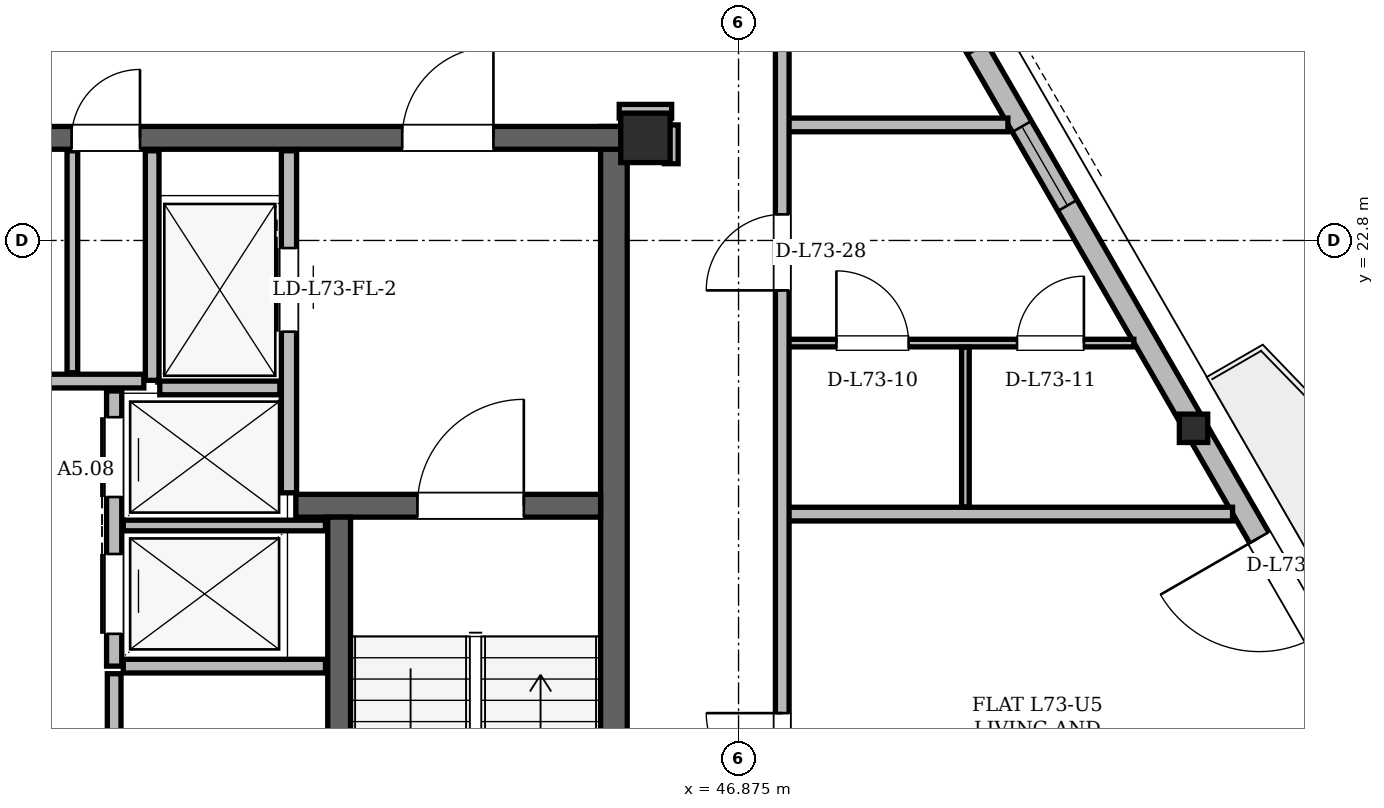
"""IFC4 building model, lengths in metres.
Left out: names, types, materials, properties, quantities, classifications, styles, units other than length and angle.
Written with IfcOpenShell. Run it as: python <this file> out.ifc"""

import sys

from ifc_helpers import new_model, si_unit, direction, frame, frame_2d, origin, origin_2d, place, context, subcontext, project, spatial, rectangle, hollow_rectangle, i_section, extrude, element, fill, save


model = new_model("IFC4")
c1 = context("Model", 3, precision=1e-05, world=origin(), true_north=direction((0.0, 1.0)))
c2 = subcontext(c1, "Body", "Model", "MODEL_VIEW")
j1 = project(units=[si_unit("LENGTHUNIT", "METRE"), si_unit("PLANEANGLEUNIT", "RADIAN")], contexts=[c1])
p1 = place(None, origin())
s1 = spatial("IfcSite", under=j1, at=p1, CompositionType="ELEMENT")
p2 = place(p1, origin())
s2 = spatial("IfcBuilding", under=s1, at=p2, CompositionType="ELEMENT")
p3 = place(p2, frame((0.0, 0.0, 277.2)))
s3 = spatial("IfcBuildingStorey", under=s2, at=p3, CompositionType="ELEMENT", Elevation=277.2)
p4 = place(p3, frame((45.65, 24.15, 0.0), z_axis=(0.0, 0.0, 1.0), x_axis=(1.0, 0.0, 0.0)))
e1 = element("IfcColumn", 1, at=p4, inside=s3, PredefinedType="COLUMN", context=c2, shape_type="SweptSolid", body=[
    extrude(hollow_rectangle(XDim=0.65, YDim=0.65, WallThickness=0.05, at=origin_2d()), origin(), (0.0, 0.0, 1.0), 3.9),
])
p5 = place(p3, frame((52.884, 20.347, 0.005), z_axis=(-0.011857822494, -0.009536449836, 0.999884217382), x_axis=(0.62670422134, -0.779257222587, 0.0)))
e2 = element("IfcColumn", 2, at=p5, inside=s3, PredefinedType="COLUMN", context=c2, shape_type="SweptSolid", body=[
    extrude(i_section(OverallWidth=0.373, OverallDepth=0.373, WebThickness=0.016, FlangeThickness=0.026, at=origin_2d()), origin(), (0.0, 0.0, 1.0), 3.891),
])
p6 = place(p3, frame((45.235, 11.0, 0.0), z_axis=(0.0, 0.0, 1.0), x_axis=(0.0, 1.0, 0.0)))
e3 = element("IfcWall", 3, at=p6, inside=s3, PredefinedType="SHEAR", context=c2, shape_type="SweptSolid", body=[
    extrude(rectangle(XDim=13.3, YDim=0.35, at=frame_2d((6.65, 0.0))), origin(), (0.0, 0.0, 1.0), 3.68),
])
p7 = place(p3, frame((29.65, 24.15, 0.0), z_axis=(0.0, 0.0, 1.0), x_axis=(1.0, 0.0, 0.0)))
e4 = element("IfcWall", 4, at=p7, inside=s3, PredefinedType="SHEAR", context=c2, shape_type="SweptSolid", body=[
    extrude(rectangle(XDim=15.7, YDim=0.3, at=frame_2d((7.85, 0.0))), origin(), (0.0, 0.0, 1.0), 3.68),
])
p8 = place(p7, frame((1.7, 0.0, 0.0)))
e5 = element("IfcOpeningElement", 5, at=p8, cuts=e4, PredefinedType="OPENING", context=c2, shape_type="SweptSolid", body=[
    extrude(rectangle(XDim=1.2, YDim=2.2, at=frame_2d((0.6, 1.1))), frame((0.0, 0.15, 0.0), z_axis=(0.0, -1.0, 0.0), x_axis=(1.0, 0.0, 0.0)), (0.0, 0.0, 1.0), 0.3),
])
p9 = place(p7, frame((12.8, 0.0, 0.0)))
e6 = element("IfcOpeningElement", 6, at=p9, cuts=e4, PredefinedType="OPENING", context=c2, shape_type="SweptSolid", body=[
    extrude(rectangle(XDim=1.2, YDim=2.2, at=frame_2d((0.6, 1.1))), frame((0.0, 0.15, 0.0), z_axis=(0.0, -1.0, 0.0), x_axis=(1.0, 0.0, 0.0)), (0.0, 0.0, 1.0), 0.3),
])
p10 = place(p7, frame((6.55, 0.0, 0.0)))
e7 = element("IfcOpeningElement", 7, at=p10, cuts=e4, PredefinedType="OPENING", context=c2, shape_type="SweptSolid", body=[
    extrude(rectangle(XDim=0.9, YDim=2.05, at=frame_2d((0.45, 1.025))), frame((0.0, 0.15, 0.0), z_axis=(0.0, -1.0, 0.0), x_axis=(1.0, 0.0, 0.0)), (0.0, 0.0, 1.0), 0.3),
])
p11 = place(p7, frame((8.45, 0.0, 0.0)))
e8 = element("IfcOpeningElement", 8, at=p11, cuts=e4, PredefinedType="OPENING", context=c2, shape_type="SweptSolid", body=[
    extrude(rectangle(XDim=0.9, YDim=2.05, at=frame_2d((0.45, 1.025))), frame((0.0, 0.15, 0.0), z_axis=(0.0, -1.0, 0.0), x_axis=(1.0, 0.0, 0.0)), (0.0, 0.0, 1.0), 0.3),
])
p12 = place(p3, frame((41.05, 19.31, 0.0), z_axis=(0.0, 0.0, 1.0), x_axis=(1.0, 0.0, 0.0)))
e9 = element("IfcWall", 9, at=p12, inside=s3, PredefinedType="SHEAR", context=c2, shape_type="SweptSolid", body=[
    extrude(rectangle(XDim=4.01, YDim=0.3, at=frame_2d((2.005, 0.0))), origin(), (0.0, 0.0, 1.0), 3.68),
])
p13 = place(p12, frame((1.6, 0.0, 0.0)))
e10 = element("IfcOpeningElement", 10, at=p13, cuts=e9, PredefinedType="OPENING", context=c2, shape_type="SweptSolid", body=[
    extrude(rectangle(XDim=1.4, YDim=2.2, at=frame_2d((0.7, 1.1))), frame((0.0, 0.15, 0.0), z_axis=(0.0, -1.0, 0.0), x_axis=(1.0, 0.0, 0.0)), (0.0, 0.0, 1.0), 0.3),
])
p14 = place(p3, frame((41.62, 11.54, 0.0), z_axis=(0.0, 0.0, 1.0), x_axis=(0.0, 1.0, 0.0)))
e11 = element("IfcWall", 11, at=p14, inside=s3, PredefinedType="SHEAR", context=c2, shape_type="SweptSolid", body=[
    extrude(rectangle(XDim=7.62, YDim=0.3, at=frame_2d((3.81, 0.0))), origin(), (0.0, 0.0, 1.0), 3.68),
])
p15 = place(p3, frame((58.493, 10.633, 0.0), z_axis=(0.0, 0.0, 1.0), x_axis=(-0.499998095684, 0.866026503239, 0.0)))
e12 = element("IfcWall", 12, at=p15, inside=s3, PredefinedType="SOLIDWALL", context=c2, shape_type="SweptSolid", body=[
    extrude(rectangle(XDim=37.389, YDim=0.29, at=frame_2d((18.695, 0.0))), origin(), (0.0, 0.0, 1.0), 3.058),
])
p16 = place(p15, frame((8.034, 0.0, 0.0)))
e13 = element("IfcOpeningElement", 13, at=p16, cuts=e12, PredefinedType="OPENING", context=c2, shape_type="SweptSolid", body=[
    extrude(rectangle(XDim=1.5, YDim=2.2, at=frame_2d((0.75, 1.1))), frame((0.0, 0.145, 0.0), z_axis=(0.0, -1.0, 0.0), x_axis=(1.0, 0.0, 0.0)), (0.0, 0.0, 1.0), 0.29),
])
p17 = place(p15, frame((29.1, 0.0, 0.0)))
e14 = element("IfcOpeningElement", 14, at=p17, cuts=e12, PredefinedType="OPENING", context=c2, shape_type="SweptSolid", body=[
    extrude(rectangle(XDim=1.5, YDim=2.2, at=frame_2d((0.75, 1.1))), frame((0.0, 0.145, 0.0), z_axis=(0.0, -1.0, 0.0), x_axis=(1.0, 0.0, 0.0)), (0.0, 0.0, 1.0), 0.29),
])
p18 = place(p15, frame((3.531, 0.0, 0.85)))
e15 = element("IfcOpeningElement", 15, at=p18, cuts=e12, PredefinedType="OPENING", context=c2, shape_type="SweptSolid", body=[
    extrude(rectangle(XDim=1.2, YDim=1.48, at=frame_2d((0.6, 0.74))), frame((0.0, 0.145, 0.0), z_axis=(0.0, -1.0, 0.0), x_axis=(1.0, 0.0, 0.0)), (0.0, 0.0, 1.0), 0.29),
])
p19 = place(p15, frame((1.055, 0.0, 0.85)))
e16 = element("IfcOpeningElement", 16, at=p19, cuts=e12, PredefinedType="OPENING", context=c2, shape_type="SweptSolid", body=[
    extrude(rectangle(XDim=1.2, YDim=1.48, at=frame_2d((0.6, 0.74))), frame((0.0, 0.145, 0.0), z_axis=(0.0, -1.0, 0.0), x_axis=(1.0, 0.0, 0.0)), (0.0, 0.0, 1.0), 0.29),
])
p20 = place(p15, frame((35.336, 0.0, 0.85)))
e17 = element("IfcOpeningElement", 17, at=p20, cuts=e12, PredefinedType="OPENING", context=c2, shape_type="SweptSolid", body=[
    extrude(rectangle(XDim=1.2, YDim=1.48, at=frame_2d((0.6, 0.74))), frame((0.0, 0.145, 0.0), z_axis=(0.0, -1.0, 0.0), x_axis=(1.0, 0.0, 0.0)), (0.0, 0.0, 1.0), 0.29),
])
p21 = place(p15, frame((16.956, 0.0, 0.85)))
e18 = element("IfcOpeningElement", 18, at=p21, cuts=e12, PredefinedType="OPENING", context=c2, shape_type="SweptSolid", body=[
    extrude(rectangle(XDim=1.2, YDim=1.48, at=frame_2d((0.6, 0.74))), frame((0.0, 0.145, 0.0), z_axis=(0.0, -1.0, 0.0), x_axis=(1.0, 0.0, 0.0)), (0.0, 0.0, 1.0), 0.29),
])
p22 = place(p15, frame((19.392, 0.0, 0.85)))
e19 = element("IfcOpeningElement", 19, at=p22, cuts=e12, PredefinedType="OPENING", context=c2, shape_type="SweptSolid", body=[
    extrude(rectangle(XDim=1.8, YDim=1.75, at=frame_2d((0.9, 0.875))), frame((0.0, 0.145, 0.0), z_axis=(0.0, -1.0, 0.0), x_axis=(1.0, 0.0, 0.0)), (0.0, 0.0, 1.0), 0.29),
])
p23 = place(p15, frame((22.638, 0.0, 0.85)))
e20 = element("IfcOpeningElement", 20, at=p23, cuts=e12, PredefinedType="OPENING", context=c2, shape_type="SweptSolid", body=[
    extrude(rectangle(XDim=2.2, YDim=1.85, at=frame_2d((1.1, 0.925))), frame((0.0, 0.145, 0.0), z_axis=(0.0, -1.0, 0.0), x_axis=(1.0, 0.0, 0.0)), (0.0, 0.0, 1.0), 0.29),
])
p24 = place(p15, frame((14.58, 0.0, 0.85)))
e21 = element("IfcOpeningElement", 21, at=p24, cuts=e12, PredefinedType="OPENING", context=c2, shape_type="SweptSolid", body=[
    extrude(rectangle(XDim=1.2, YDim=1.48, at=frame_2d((0.6, 0.74))), frame((0.0, 0.145, 0.0), z_axis=(0.0, -1.0, 0.0), x_axis=(1.0, 0.0, 0.0)), (0.0, 0.0, 1.0), 0.29),
])
p25 = place(p3, frame((40.96, 19.48, 0.0), z_axis=(0.0, 0.0, 1.0), x_axis=(0.0, 1.0, 0.0)))
e22 = element("IfcWall", 22, at=p25, inside=s3, PredefinedType="PARTITIONING", context=c2, shape_type="SweptSolid", body=[
    extrude(rectangle(XDim=4.5, YDim=0.2, at=frame_2d((2.25, 0.0))), origin(), (0.0, 0.0, 1.0), 3.68),
])
p26 = place(p25, frame((2.12, 0.0, 0.0)))
e23 = element("IfcOpeningElement", 23, at=p26, cuts=e22, PredefinedType="OPENING", context=c2, shape_type="SweptSolid", body=[
    extrude(rectangle(XDim=1.1, YDim=2.2, at=frame_2d((0.55, 1.1))), frame((0.0, 0.1, 0.0), z_axis=(0.0, -1.0, 0.0), x_axis=(1.0, 0.0, 0.0)), (0.0, 0.0, 1.0), 0.2),
])
p27 = place(p3, frame((39.16, 20.96, 0.0), z_axis=(0.0, 0.0, 1.0), x_axis=(0.0, 1.0, 0.0)))
e24 = element("IfcWall", 24, at=p27, inside=s3, PredefinedType="PARTITIONING", context=c2, shape_type="SweptSolid", body=[
    extrude(rectangle(XDim=3.02, YDim=0.18, at=frame_2d((1.51, 0.0))), origin(), (0.0, 0.0, 1.0), 3.68),
])
p28 = place(p3, frame((39.26, 20.86, 0.0), z_axis=(0.0, 0.0, 1.0), x_axis=(1.0, 0.0, 0.0)))
e25 = element("IfcWall", 25, at=p28, inside=s3, PredefinedType="PARTITIONING", context=c2, shape_type="SweptSolid", body=[
    extrude(rectangle(XDim=1.58, YDim=0.18, at=frame_2d((0.79, 0.0))), origin(), (0.0, 0.0, 1.0), 3.68),
])
p29 = place(p3, frame((38.66, 17.2, 0.0), z_axis=(0.0, 0.0, 1.0), x_axis=(0.0, 1.0, 0.0)))
e26 = element("IfcWall", 26, at=p29, inside=s3, PredefinedType="PARTITIONING", context=c2, shape_type="SweptSolid", body=[
    extrude(rectangle(XDim=3.62, YDim=0.2, at=frame_2d((1.81, 0.0))), origin(), (0.0, 0.0, 1.0), 3.68),
])
p30 = place(p29, frame((0.425, 0.0, 0.0)))
e27 = element("IfcOpeningElement", 27, at=p30, cuts=e26, PredefinedType="OPENING", context=c2, shape_type="SweptSolid", body=[
    extrude(rectangle(XDim=1.05, YDim=2.15, at=frame_2d((0.525, 1.075))), frame((0.0, 0.1, 0.0), z_axis=(0.0, -1.0, 0.0), x_axis=(1.0, 0.0, 0.0)), (0.0, 0.0, 1.0), 0.2),
])
p31 = place(p29, frame((2.225, 0.0, 0.0)))
e28 = element("IfcOpeningElement", 28, at=p31, cuts=e26, PredefinedType="OPENING", context=c2, shape_type="SweptSolid", body=[
    extrude(rectangle(XDim=1.05, YDim=2.15, at=frame_2d((0.525, 1.075))), frame((0.0, 0.1, 0.0), z_axis=(0.0, -1.0, 0.0), x_axis=(1.0, 0.0, 0.0)), (0.0, 0.0, 1.0), 0.2),
])
p32 = place(p3, frame((38.78, 17.2, 0.0), z_axis=(0.0, 0.0, 1.0), x_axis=(1.0, 0.0, 0.0)))
e29 = element("IfcWall", 29, at=p32, inside=s3, PredefinedType="PARTITIONING", context=c2, shape_type="SweptSolid", body=[
    extrude(rectangle(XDim=2.66, YDim=0.18, at=frame_2d((1.33, 0.0))), origin(), (0.0, 0.0, 1.0), 3.68),
])
p33 = place(p3, frame((38.78, 19.05, 0.0), z_axis=(0.0, 0.0, 1.0), x_axis=(1.0, 0.0, 0.0)))
e30 = element("IfcWall", 30, at=p33, inside=s3, PredefinedType="PARTITIONING", context=c2, shape_type="SweptSolid", body=[
    extrude(rectangle(XDim=2.66, YDim=0.14, at=frame_2d((1.33, 0.0))), origin(), (0.0, 0.0, 1.0), 3.68),
])
p34 = place(p3, frame((38.66, 11.55, 0.0), z_axis=(0.0, 0.0, 1.0), x_axis=(0.0, 1.0, 0.0)))
e31 = element("IfcWall", 31, at=p34, inside=s3, PredefinedType="PARTITIONING", context=c2, shape_type="SweptSolid", body=[
    extrude(rectangle(XDim=5.55, YDim=0.18, at=frame_2d((2.775, 0.0))), origin(), (0.0, 0.0, 1.0), 3.68),
])
p35 = place(p34, frame((3.15, 0.0, 0.0)))
e32 = element("IfcOpeningElement", 32, at=p35, cuts=e31, PredefinedType="OPENING", context=c2, shape_type="SweptSolid", body=[
    extrude(rectangle(XDim=0.95, YDim=2.1, at=frame_2d((0.475, 1.05))), frame((0.0, 0.09, 0.0), z_axis=(0.0, -1.0, 0.0), x_axis=(1.0, 0.0, 0.0)), (0.0, 0.0, 1.0), 0.18),
])
p36 = place(p3, frame((35.95, 20.95, 0.0), z_axis=(0.0, 0.0, 1.0), x_axis=(1.0, 0.0, 0.0)))
e33 = element("IfcWall", 33, at=p36, inside=s3, PredefinedType="PARTITIONING", context=c2, shape_type="SweptSolid", body=[
    extrude(rectangle(XDim=3.1, YDim=0.18, at=frame_2d((1.55, 0.0))), origin(), (0.0, 0.0, 1.0), 3.68),
])
p37 = place(p3, frame((38.11, 21.06, 0.0), z_axis=(0.0, 0.0, 1.0), x_axis=(0.0, 1.0, 0.0)))
e34 = element("IfcWall", 34, at=p37, inside=s3, PredefinedType="PARTITIONING", context=c2, shape_type="SweptSolid", body=[
    extrude(rectangle(XDim=2.92, YDim=0.14, at=frame_2d((1.46, 0.0))), origin(), (0.0, 0.0, 1.0), 3.68),
])
p38 = place(p3, frame((47.45, 19.2, 0.0), z_axis=(0.0, 0.0, 1.0), x_axis=(1.0, 0.0, 0.0)))
e35 = element("IfcWall", 35, at=p38, inside=s3, PredefinedType="PARTITIONING", context=c2, shape_type="SweptSolid", body=[
    extrude(rectangle(XDim=5.925, YDim=0.18, at=frame_2d((2.962, 0.0))), origin(), (0.0, 0.0, 1.0), 3.68),
])
p39 = place(p3, frame((47.4, 21.45, 0.0), z_axis=(0.0, 0.0, 1.0), x_axis=(1.0, 0.0, 0.0)))
e36 = element("IfcWall", 36, at=p39, inside=s3, PredefinedType="PARTITIONING", context=c2, shape_type="SweptSolid", body=[
    extrude(rectangle(XDim=4.676, YDim=0.1, at=frame_2d((2.338, 0.0))), origin(), (0.0, 0.0, 1.0), 3.68),
])
p40 = place(p39, frame((0.763, 0.0, 0.0)))
e37 = element("IfcOpeningElement", 37, at=p40, cuts=e36, PredefinedType="OPENING", context=c2, shape_type="SweptSolid", body=[
    extrude(rectangle(XDim=0.95, YDim=2.1, at=frame_2d((0.475, 1.05))), frame((0.0, 0.05, 0.0), z_axis=(0.0, -1.0, 0.0), x_axis=(1.0, 0.0, 0.0)), (0.0, 0.0, 1.0), 0.1),
])
p41 = place(p39, frame((3.139, 0.0, 0.0)))
e38 = element("IfcOpeningElement", 38, at=p41, cuts=e36, PredefinedType="OPENING", context=c2, shape_type="SweptSolid", body=[
    extrude(rectangle(XDim=0.88, YDim=2.08, at=frame_2d((0.44, 1.04))), frame((0.0, 0.05, 0.0), z_axis=(0.0, -1.0, 0.0), x_axis=(1.0, 0.0, 0.0)), (0.0, 0.0, 1.0), 0.1),
])
p42 = place(p3, frame((47.45, 24.32, 0.0), z_axis=(0.0, 0.0, 1.0), x_axis=(1.0, 0.0, 0.0)))
e39 = element("IfcWall", 39, at=p42, inside=s3, PredefinedType="PARTITIONING", context=c2, shape_type="SweptSolid", body=[
    extrude(rectangle(XDim=2.969, YDim=0.18, at=frame_2d((1.484, 0.0))), origin(), (0.0, 0.0, 1.0), 3.68),
])
p43 = place(p3, frame((45.305, 24.5, 0.0), z_axis=(0.0, 0.0, 1.0), x_axis=(1.0, 0.0, 0.0)))
e40 = element("IfcWall", 40, at=p43, inside=s3, PredefinedType="PARTITIONING", context=c2, shape_type="SweptSolid", body=[
    extrude(rectangle(XDim=0.69, YDim=0.18, at=frame_2d((0.345, 0.0))), origin(), (0.0, 0.0, 1.0), 3.266),
])
p44 = place(p3, frame((45.99, 23.81, 0.0), z_axis=(0.0, 0.0, 1.0), x_axis=(0.0, 1.0, 0.0)))
e41 = element("IfcWall", 41, at=p44, inside=s3, PredefinedType="PARTITIONING", context=c2, shape_type="SweptSolid", body=[
    extrude(rectangle(XDim=0.51, YDim=0.18, at=frame_2d((0.255, 0.0))), origin(), (0.0, 0.0, 1.0), 3.68),
])
p45 = place(p3, frame((47.45, 9.394, 0.0), z_axis=(0.0, 0.0, 1.0), x_axis=(0.0, 1.0, 0.0)))
e42 = element("IfcWall", 42, at=p45, inside=s3, PredefinedType="PARTITIONING", context=c2, shape_type="SweptSolid", body=[
    extrude(rectangle(XDim=16.482, YDim=0.18, at=frame_2d((8.241, 0.0))), origin(), (0.0, 0.0, 1.0), 3.266),
])
p46 = place(p45, frame((6.188, 0.0, 0.0)))
e43 = element("IfcOpeningElement", 43, at=p46, cuts=e42, PredefinedType="OPENING", context=c2, shape_type="SweptSolid", body=[
    extrude(rectangle(XDim=1.0, YDim=2.18, at=frame_2d((0.5, 1.09))), frame((0.0, 0.09, 0.0), z_axis=(0.0, -1.0, 0.0), x_axis=(1.0, 0.0, 0.0)), (0.0, 0.0, 1.0), 0.18),
])
p47 = place(p45, frame((12.749, 0.0, 0.0)))
e44 = element("IfcOpeningElement", 44, at=p47, cuts=e42, PredefinedType="OPENING", context=c2, shape_type="SweptSolid", body=[
    extrude(rectangle(XDim=1.0, YDim=2.18, at=frame_2d((0.5, 1.09))), frame((0.0, 0.09, 0.0), z_axis=(0.0, -1.0, 0.0), x_axis=(1.0, 0.0, 0.0)), (0.0, 0.0, 1.0), 0.18),
])
p48 = place(p3, frame((49.86, 19.294, 0.0), z_axis=(0.0, 0.0, 1.0), x_axis=(0.0, 1.0, 0.0)))
e45 = element("IfcWall", 45, at=p48, inside=s3, PredefinedType="PARTITIONING", context=c2, shape_type="SweptSolid", body=[
    extrude(rectangle(XDim=2.102, YDim=0.1, at=frame_2d((1.051, 0.0))), origin(), (0.0, 0.0, 1.0), 3.68),
])
p49 = place(p16, origin())
e46 = element("IfcDoor", 46, at=p49, inside=s3, OperationType="SINGLE_SWING_RIGHT", PredefinedType="DOOR", context=c2, shape_type="SweptSolid", body=[
    extrude(rectangle(XDim=1.5, YDim=2.2, at=frame_2d((0.75, 1.1))), frame((0.0, 0.025, 0.0), z_axis=(0.0, -1.0, 0.0), x_axis=(1.0, 0.0, 0.0)), (0.0, 0.0, 1.0), 0.05),
])
fill(e13, e46)
p50 = place(p24, origin())
e47 = element("IfcWindow", 47, at=p50, inside=s3, PartitioningType="SINGLE_PANEL", PredefinedType="WINDOW", context=c2, shape_type="SweptSolid", body=[
    extrude(rectangle(XDim=1.2, YDim=1.48, at=frame_2d((0.6, 0.74))), frame((0.0, 0.03, 0.0), z_axis=(0.0, -1.0, 0.0), x_axis=(1.0, 0.0, 0.0)), (0.0, 0.0, 1.0), 0.06),
])
fill(e21, e47)
p51 = place(p26, origin())
e48 = element("IfcDoor", 48, at=p51, inside=s3, OperationType="SLIDING_TO_RIGHT", PredefinedType="DOOR", context=c2, shape_type="SweptSolid", body=[
    extrude(rectangle(XDim=1.1, YDim=2.2, at=frame_2d((0.55, 1.1))), frame((0.0, 0.025, 0.0), z_axis=(0.0, -1.0, 0.0), x_axis=(1.0, 0.0, 0.0)), (0.0, 0.0, 1.0), 0.05),
])
fill(e23, e48)
p52 = place(p30, origin())
e49 = element("IfcDoor", 49, at=p52, inside=s3, OperationType="SLIDING_TO_RIGHT", PredefinedType="DOOR", context=c2, shape_type="SweptSolid", body=[
    extrude(rectangle(XDim=1.05, YDim=2.15, at=frame_2d((0.525, 1.075))), frame((0.0, 0.025, 0.0), z_axis=(0.0, -1.0, 0.0), x_axis=(1.0, 0.0, 0.0)), (0.0, 0.0, 1.0), 0.05),
])
fill(e27, e49)
p53 = place(p31, origin())
e50 = element("IfcDoor", 50, at=p53, inside=s3, OperationType="SLIDING_TO_LEFT", PredefinedType="DOOR", context=c2, shape_type="SweptSolid", body=[
    extrude(rectangle(XDim=1.05, YDim=2.15, at=frame_2d((0.525, 1.075))), frame((0.0, 0.025, 0.0), z_axis=(0.0, -1.0, 0.0), x_axis=(1.0, 0.0, 0.0)), (0.0, 0.0, 1.0), 0.05),
])
fill(e28, e50)
p54 = place(p13, origin())
e51 = element("IfcDoor", 51, at=p54, inside=s3, OperationType="SINGLE_SWING_RIGHT", PredefinedType="DOOR", context=c2, shape_type="SweptSolid", body=[
    extrude(rectangle(XDim=1.4, YDim=2.2, at=frame_2d((0.7, 1.1))), frame((0.0, 0.025, 0.0), z_axis=(0.0, -1.0, 0.0), x_axis=(1.0, 0.0, 0.0)), (0.0, 0.0, 1.0), 0.05),
])
fill(e10, e51)
p55 = place(p9, origin())
e52 = element("IfcDoor", 52, at=p55, inside=s3, OperationType="SINGLE_SWING_RIGHT", PredefinedType="DOOR", context=c2, shape_type="SweptSolid", body=[
    extrude(rectangle(XDim=1.2, YDim=2.2, at=frame_2d((0.6, 1.1))), frame((0.0, 0.025, 0.0), z_axis=(0.0, -1.0, 0.0), x_axis=(1.0, 0.0, 0.0)), (0.0, 0.0, 1.0), 0.05),
])
fill(e6, e52)
p56 = place(p11, origin())
e53 = element("IfcDoor", 53, at=p56, inside=s3, OperationType="SINGLE_SWING_RIGHT", PredefinedType="DOOR", context=c2, shape_type="SweptSolid", body=[
    extrude(rectangle(XDim=0.9, YDim=2.05, at=frame_2d((0.45, 1.025))), frame((0.0, 0.025, 0.0), z_axis=(0.0, -1.0, 0.0), x_axis=(1.0, 0.0, 0.0)), (0.0, 0.0, 1.0), 0.05),
])
fill(e8, e53)
p57 = place(p40, origin())
e54 = element("IfcDoor", 54, at=p57, inside=s3, OperationType="SINGLE_SWING_LEFT", PredefinedType="DOOR", context=c2, shape_type="SweptSolid", body=[
    extrude(rectangle(XDim=0.95, YDim=2.1, at=frame_2d((0.475, 1.05))), frame((0.0, 0.025, 0.0), z_axis=(0.0, -1.0, 0.0), x_axis=(1.0, 0.0, 0.0)), (0.0, 0.0, 1.0), 0.05),
])
fill(e37, e54)
p58 = place(p41, origin())
e55 = element("IfcDoor", 55, at=p58, inside=s3, OperationType="SINGLE_SWING_RIGHT", PredefinedType="DOOR", context=c2, shape_type="SweptSolid", body=[
    extrude(rectangle(XDim=0.88, YDim=2.08, at=frame_2d((0.44, 1.04))), frame((0.0, 0.025, 0.0), z_axis=(0.0, -1.0, 0.0), x_axis=(1.0, 0.0, 0.0)), (0.0, 0.0, 1.0), 0.05),
])
fill(e38, e55)
p59 = place(p46, origin())
e56 = element("IfcDoor", 56, at=p59, inside=s3, OperationType="SINGLE_SWING_RIGHT", PredefinedType="DOOR", context=c2, shape_type="SweptSolid", body=[
    extrude(rectangle(XDim=1.0, YDim=2.18, at=frame_2d((0.5, 1.09))), frame((0.0, 0.025, 0.0), z_axis=(0.0, -1.0, 0.0), x_axis=(1.0, 0.0, 0.0)), (0.0, 0.0, 1.0), 0.05),
])
fill(e43, e56)
p60 = place(p47, origin())
e57 = element("IfcDoor", 57, at=p60, inside=s3, OperationType="SINGLE_SWING_LEFT", PredefinedType="DOOR", context=c2, shape_type="SweptSolid", body=[
    extrude(rectangle(XDim=1.0, YDim=2.18, at=frame_2d((0.5, 1.09))), frame((0.0, 0.025, 0.0), z_axis=(0.0, -1.0, 0.0), x_axis=(1.0, 0.0, 0.0)), (0.0, 0.0, 1.0), 0.05),
])
fill(e44, e57)
save(model, sys.argv[1])
